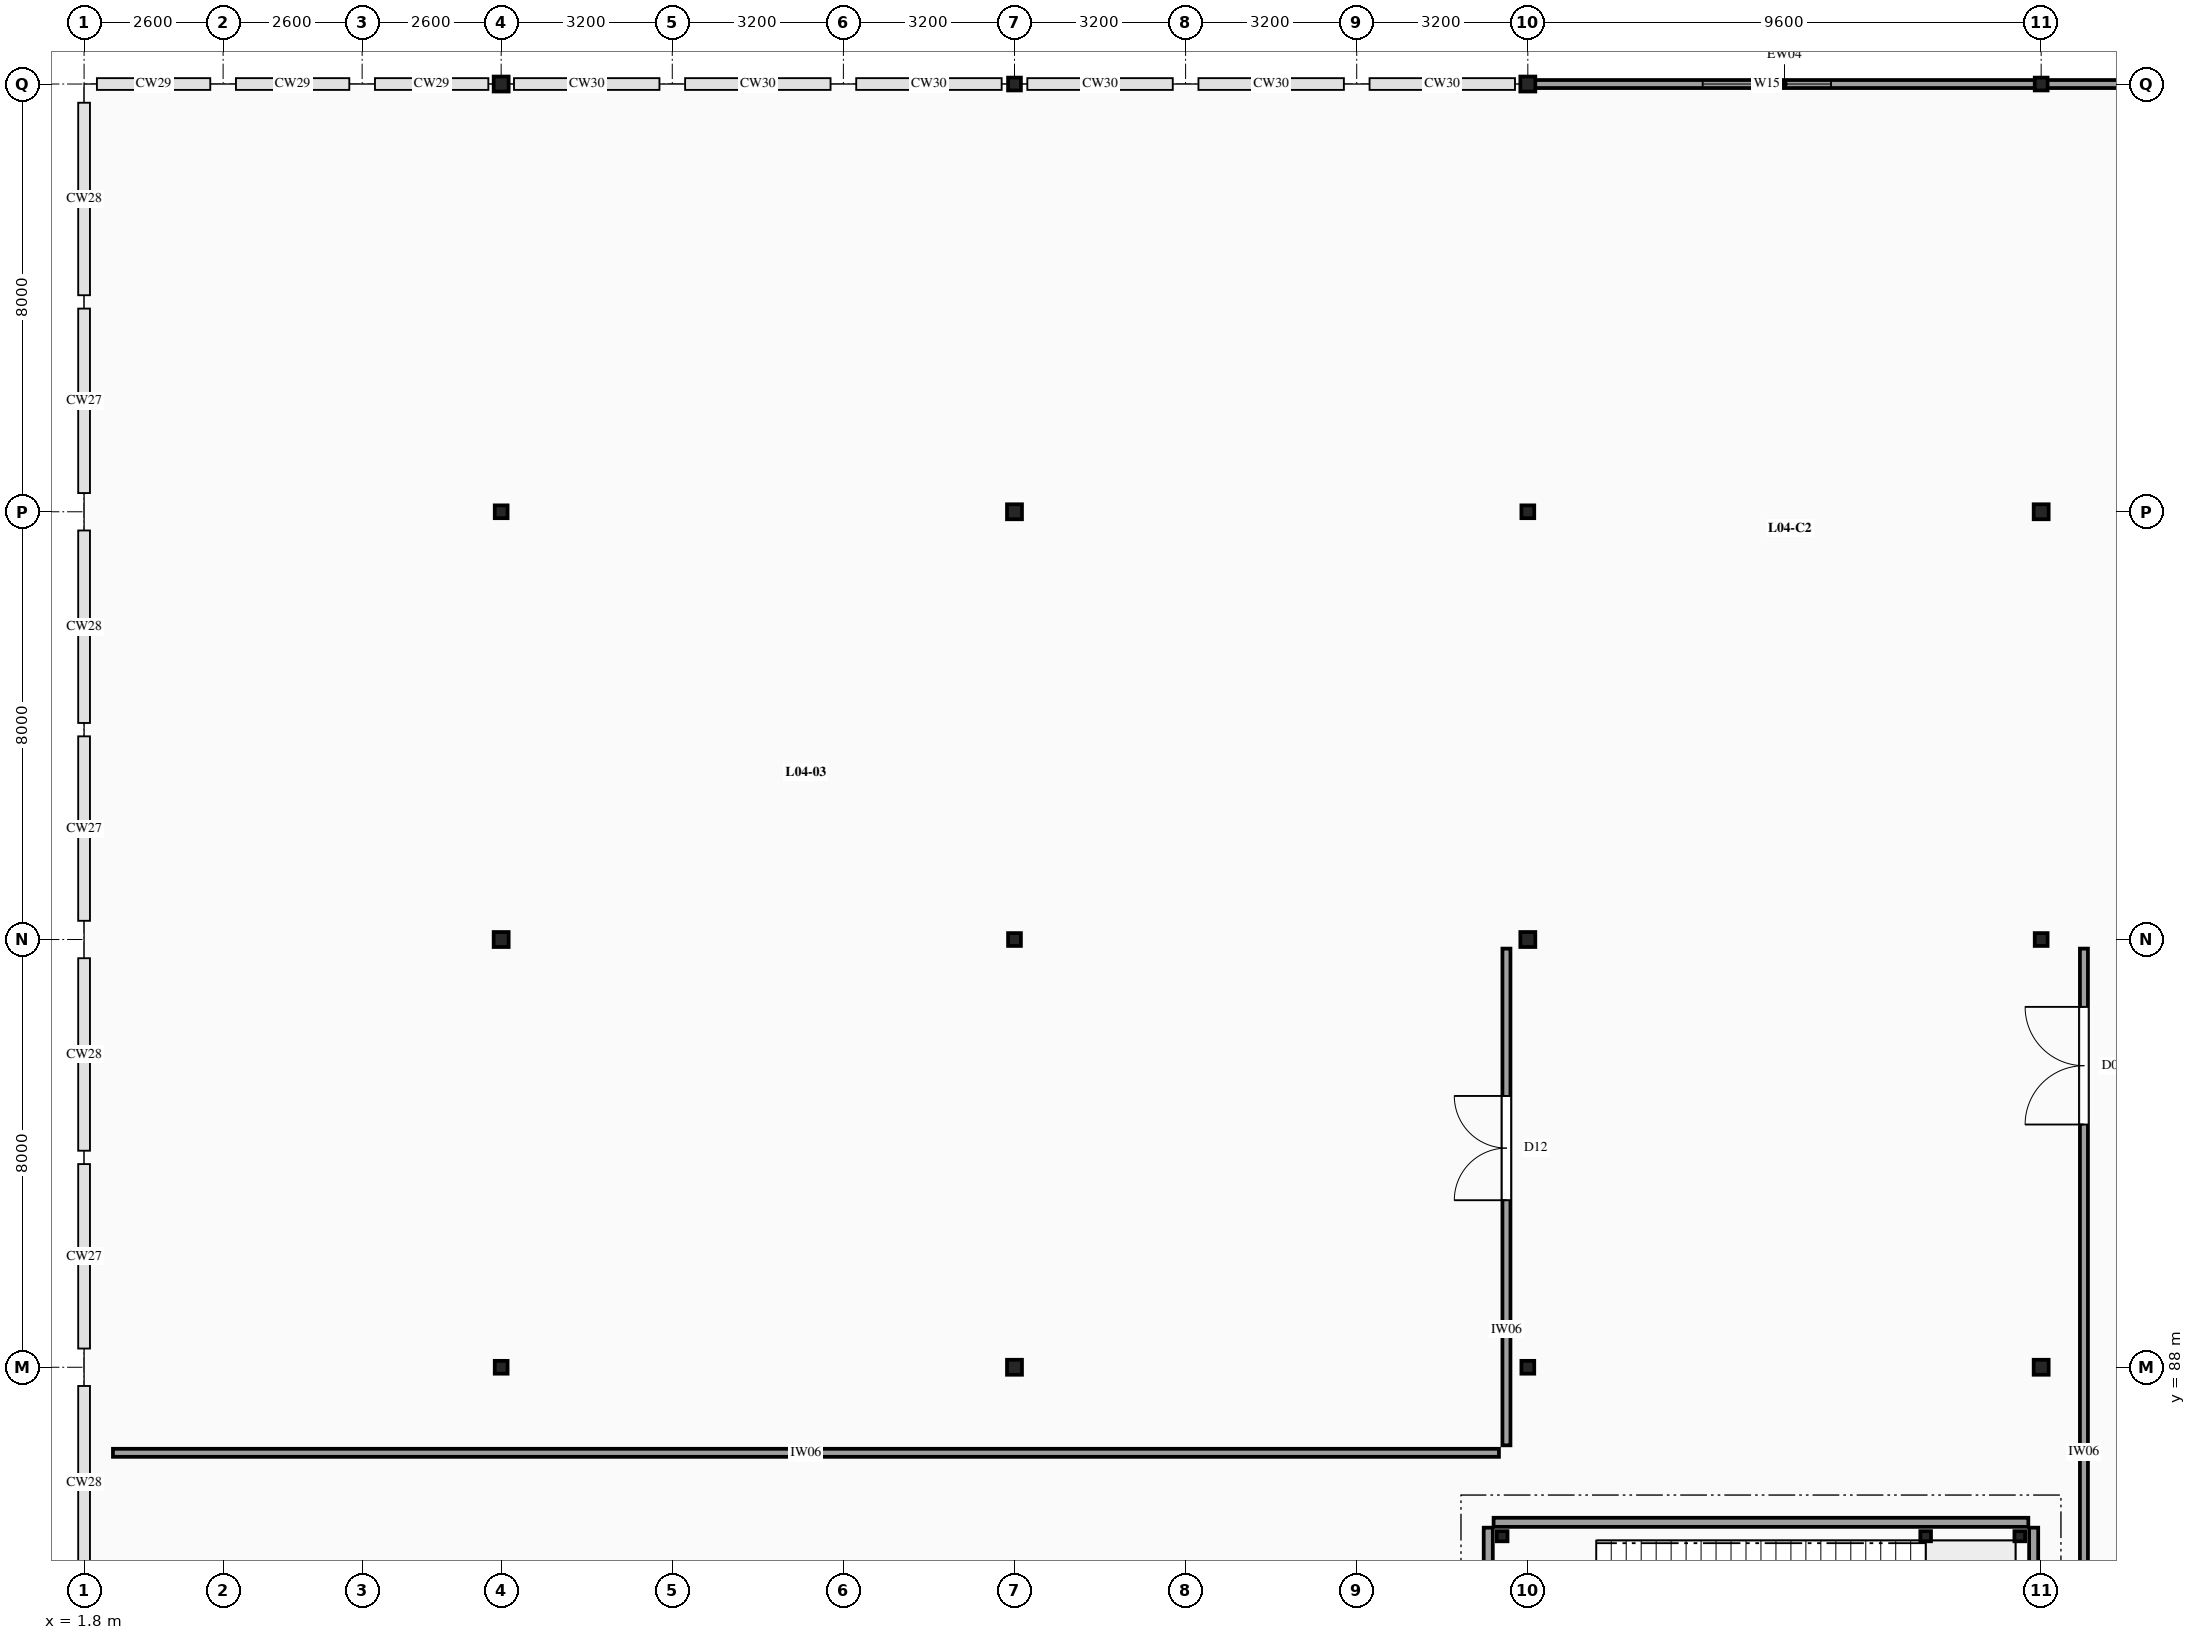
"""IFC4 building model, lengths in metres.
Left out: names, types, materials, properties, quantities, classifications, styles, units other than length and angle.
Written with IfcOpenShell. Run it as: python <this file> out.ifc"""

import sys

from ifc_helpers import new_model, si_unit, direction, frame, frame_2d, origin, origin_2d, place, context, subcontext, project, spatial, rectangle, i_section, extrude, element, fill, save


model = new_model("IFC4")
c1 = context("Model", 3, precision=1e-05, world=origin(), true_north=direction((0.0, 1.0)))
c2 = subcontext(c1, "Body", "Model", "MODEL_VIEW")
j1 = project(units=[si_unit("LENGTHUNIT", "METRE"), si_unit("PLANEANGLEUNIT", "RADIAN")], contexts=[c1])
p1 = place(None, origin())
s1 = spatial("IfcSite", under=j1, at=p1, CompositionType="ELEMENT")
p2 = place(p1, origin())
s2 = spatial("IfcBuilding", under=s1, at=p2, CompositionType="ELEMENT")
p3 = place(p2, frame((0.0, 0.0, 17.4)))
s3 = spatial("IfcBuildingStorey", under=s2, at=p3, CompositionType="ELEMENT", Elevation=17.4)
p4 = place(p3, frame((9.6, 88.0, -0.28), z_axis=(0.0, 0.0, 1.0), x_axis=(1.0, 0.0, 0.0)))
e1 = element("IfcColumn", 1, at=p4, inside=s3, PredefinedType="COLUMN", context=c2, shape_type="SweptSolid", body=[
    extrude(i_section(OverallWidth=0.24, OverallDepth=0.24, WebThickness=0.01, FlangeThickness=0.017, FilletRadius=0.021, at=origin_2d()), origin(), (0.0, 0.0, 1.0), 8.42),
])
p5 = place(p3, frame((9.6, 96.0, -0.28), z_axis=(0.0, 0.0, 1.0), x_axis=(1.0, 0.0, 0.0)))
e2 = element("IfcColumn", 2, at=p5, inside=s3, PredefinedType="COLUMN", context=c2, shape_type="SweptSolid", body=[
    extrude(i_section(OverallWidth=0.28, OverallDepth=0.28, WebThickness=0.01, FlangeThickness=0.018, FilletRadius=0.024, at=origin_2d()), origin(), (0.0, 0.0, 1.0), 8.42),
])
p6 = place(p3, frame((9.6, 104.0, -0.28), z_axis=(0.0, 0.0, 1.0), x_axis=(1.0, 0.0, 0.0)))
e3 = element("IfcColumn", 3, at=p6, inside=s3, PredefinedType="COLUMN", context=c2, shape_type="SweptSolid", body=[
    extrude(i_section(OverallWidth=0.24, OverallDepth=0.24, WebThickness=0.01, FlangeThickness=0.017, FilletRadius=0.021, at=origin_2d()), origin(), (0.0, 0.0, 1.0), 8.42),
])
for number, where, z_axis, x_axis in (
    (4, (9.6, 112.0, -0.28), (0.0, 0.0, 1.0), (1.0, 0.0, 0.0)),
    (5, (19.2, 88.0, -0.28), (0.0, 0.0, 1.0), (1.0, 0.0, 0.0)),
):
    element("IfcColumn", number, at=place(p3, frame(where, z_axis=z_axis, x_axis=x_axis)), inside=s3, PredefinedType="COLUMN", context=c2, shape_type="SweptSolid", body=[
        extrude(i_section(OverallWidth=0.28, OverallDepth=0.28, WebThickness=0.01, FlangeThickness=0.018, FilletRadius=0.024, at=origin_2d()), origin(), (0.0, 0.0, 1.0), 8.42),
    ])
p7 = place(p3, frame((19.2, 96.0, -0.28), z_axis=(0.0, 0.0, 1.0), x_axis=(1.0, 0.0, 0.0)))
e6 = element("IfcColumn", 6, at=p7, inside=s3, PredefinedType="COLUMN", context=c2, shape_type="SweptSolid", body=[
    extrude(i_section(OverallWidth=0.24, OverallDepth=0.24, WebThickness=0.01, FlangeThickness=0.017, FilletRadius=0.021, at=origin_2d()), origin(), (0.0, 0.0, 1.0), 8.42),
])
p8 = place(p3, frame((19.2, 104.0, -0.28), z_axis=(0.0, 0.0, 1.0), x_axis=(1.0, 0.0, 0.0)))
e7 = element("IfcColumn", 7, at=p8, inside=s3, PredefinedType="COLUMN", context=c2, shape_type="SweptSolid", body=[
    extrude(i_section(OverallWidth=0.28, OverallDepth=0.28, WebThickness=0.01, FlangeThickness=0.018, FilletRadius=0.024, at=origin_2d()), origin(), (0.0, 0.0, 1.0), 8.42),
])
for number, where, z_axis, x_axis in (
    (8, (19.2, 112.0, -0.28), (0.0, 0.0, 1.0), (1.0, 0.0, 0.0)),
    (9, (28.8, 88.0, -0.28), (0.0, 0.0, 1.0), (1.0, 0.0, 0.0)),
):
    element("IfcColumn", number, at=place(p3, frame(where, z_axis=z_axis, x_axis=x_axis)), inside=s3, PredefinedType="COLUMN", context=c2, shape_type="SweptSolid", body=[
        extrude(i_section(OverallWidth=0.24, OverallDepth=0.24, WebThickness=0.01, FlangeThickness=0.017, FilletRadius=0.021, at=origin_2d()), origin(), (0.0, 0.0, 1.0), 8.42),
    ])
p9 = place(p3, frame((28.8, 96.0, -0.28), z_axis=(0.0, 0.0, 1.0), x_axis=(1.0, 0.0, 0.0)))
e10 = element("IfcColumn", 10, at=p9, inside=s3, PredefinedType="COLUMN", context=c2, shape_type="SweptSolid", body=[
    extrude(i_section(OverallWidth=0.28, OverallDepth=0.28, WebThickness=0.01, FlangeThickness=0.018, FilletRadius=0.024, at=origin_2d()), origin(), (0.0, 0.0, 1.0), 8.42),
])
p10 = place(p3, frame((28.8, 104.0, -0.28), z_axis=(0.0, 0.0, 1.0), x_axis=(1.0, 0.0, 0.0)))
e11 = element("IfcColumn", 11, at=p10, inside=s3, PredefinedType="COLUMN", context=c2, shape_type="SweptSolid", body=[
    extrude(i_section(OverallWidth=0.24, OverallDepth=0.24, WebThickness=0.01, FlangeThickness=0.017, FilletRadius=0.021, at=origin_2d()), origin(), (0.0, 0.0, 1.0), 8.42),
])
for number, where, z_axis, x_axis in (
    (12, (28.8, 112.0, -0.28), (0.0, 0.0, 1.0), (1.0, 0.0, 0.0)),
    (13, (38.4, 88.0, -0.28), (0.0, 0.0, 1.0), (1.0, 0.0, 0.0)),
):
    element("IfcColumn", number, at=place(p3, frame(where, z_axis=z_axis, x_axis=x_axis)), inside=s3, PredefinedType="COLUMN", context=c2, shape_type="SweptSolid", body=[
        extrude(i_section(OverallWidth=0.28, OverallDepth=0.28, WebThickness=0.01, FlangeThickness=0.018, FilletRadius=0.024, at=origin_2d()), origin(), (0.0, 0.0, 1.0), 8.42),
    ])
p11 = place(p3, frame((38.4, 96.0, -0.28), z_axis=(0.0, 0.0, 1.0), x_axis=(1.0, 0.0, 0.0)))
e14 = element("IfcColumn", 14, at=p11, inside=s3, PredefinedType="COLUMN", context=c2, shape_type="SweptSolid", body=[
    extrude(i_section(OverallWidth=0.24, OverallDepth=0.24, WebThickness=0.01, FlangeThickness=0.017, FilletRadius=0.021, at=origin_2d()), origin(), (0.0, 0.0, 1.0), 8.42),
])
p12 = place(p3, frame((38.4, 104.0, -0.28), z_axis=(0.0, 0.0, 1.0), x_axis=(1.0, 0.0, 0.0)))
e15 = element("IfcColumn", 15, at=p12, inside=s3, PredefinedType="COLUMN", context=c2, shape_type="SweptSolid", body=[
    extrude(i_section(OverallWidth=0.28, OverallDepth=0.28, WebThickness=0.01, FlangeThickness=0.018, FilletRadius=0.024, at=origin_2d()), origin(), (0.0, 0.0, 1.0), 8.42),
])
p13 = place(p3, frame((38.4, 112.0, -0.28), z_axis=(0.0, 0.0, 1.0), x_axis=(1.0, 0.0, 0.0)))
e16 = element("IfcColumn", 16, at=p13, inside=s3, PredefinedType="COLUMN", context=c2, shape_type="SweptSolid", body=[
    extrude(i_section(OverallWidth=0.24, OverallDepth=0.24, WebThickness=0.01, FlangeThickness=0.017, FilletRadius=0.021, at=origin_2d()), origin(), (0.0, 0.0, 1.0), 8.42),
])
for number, where, z_axis, x_axis in (
    (17, (38.0, 84.84, 0.0), (0.0, 0.0, 1.0), (1.0, 0.0, 0.0)),
    (18, (28.32, 84.84, 0.0), (0.0, 0.0, 1.0), (1.0, 0.0, 0.0)),
    (19, (36.24, 84.84, 0.0), (0.0, 0.0, 1.0), (1.0, 0.0, 0.0)),
):
    element("IfcColumn", number, at=place(p3, frame(where, z_axis=z_axis, x_axis=x_axis)), inside=s3, PredefinedType="COLUMN", context=c2, shape_type="SweptSolid", body=[
        extrude(i_section(OverallWidth=0.2, OverallDepth=0.19, WebThickness=0.007, FlangeThickness=0.01, FilletRadius=0.018, at=origin_2d()), origin(), (0.0, 0.0, 1.0), 8.4),
    ])
p14 = place(p3, frame((28.82, 112.0, 0.0), z_axis=(0.0, 0.0, 1.0), x_axis=(1.0, 0.0, 0.0)))
e20 = element("IfcWall", 20, at=p14, inside=s3, PredefinedType="SOLIDWALL", context=c2, shape_type="SweptSolid", body=[
    extrude(rectangle(XDim=9.56, YDim=0.15, at=frame_2d((4.78, 0.0))), origin(), (0.0, 0.0, 1.0), 7.6),
])
p15 = place(p14, frame((3.25, 0.0, 0.95)))
e21 = element("IfcOpeningElement", 21, at=p15, cuts=e20, PredefinedType="OPENING", context=c2, shape_type="SweptSolid", body=[
    extrude(rectangle(XDim=2.4, YDim=2.2, at=frame_2d((1.2, 1.1))), frame((0.0, 0.085, 0.0), z_axis=(0.0, -1.0, 0.0), x_axis=(1.0, 0.0, 0.0)), (0.0, 0.0, 1.0), 0.17),
])
p16 = place(p3, frame((38.42, 112.0, 0.0), z_axis=(0.0, 0.0, 1.0), x_axis=(1.0, 0.0, 0.0)))
e22 = element("IfcWall", 22, at=p16, inside=s3, PredefinedType="SOLIDWALL", context=c2, shape_type="SweptSolid", body=[
    extrude(rectangle(XDim=9.56, YDim=0.15, at=frame_2d((4.78, 0.0))), origin(), (0.0, 0.0, 1.0), 7.6),
])
p17 = place(p16, frame((3.25, 0.0, 0.95)))
e23 = element("IfcOpeningElement", 23, at=p17, cuts=e22, PredefinedType="OPENING", context=c2, shape_type="SweptSolid", body=[
    extrude(rectangle(XDim=2.4, YDim=2.2, at=frame_2d((1.2, 1.1))), frame((0.0, 0.085, 0.0), z_axis=(0.0, -1.0, 0.0), x_axis=(1.0, 0.0, 0.0)), (0.0, 0.0, 1.0), 0.17),
])
p18 = place(p3, frame((28.06, 80.96, 0.0), z_axis=(0.0, 0.0, 1.0), x_axis=(0.0, 1.0, 0.0)))
e24 = element("IfcWall", 24, at=p18, inside=s3, PredefinedType="SOLIDWALL", context=c2, shape_type="SweptSolid", body=[
    extrude(rectangle(XDim=4.04, YDim=0.17, at=frame_2d((2.02, 0.0))), origin(), (0.0, 0.0, 1.0), 7.5),
])
p19 = place(p18, frame((1.27, 0.0, 0.0)))
e25 = element("IfcOpeningElement", 25, at=p19, cuts=e24, PredefinedType="OPENING", context=c2, shape_type="SweptSolid", body=[
    extrude(rectangle(XDim=1.5, YDim=2.2, at=frame_2d((0.75, 1.1))), frame((0.0, 0.095, 0.0), z_axis=(0.0, -1.0, 0.0), x_axis=(1.0, 0.0, 0.0)), (0.0, 0.0, 1.0), 0.19),
])
p20 = place(p3, frame((38.26, 80.96, 0.0), z_axis=(0.0, 0.0, 1.0), x_axis=(0.0, 1.0, 0.0)))
e26 = element("IfcWall", 26, at=p20, inside=s3, PredefinedType="SOLIDWALL", context=c2, shape_type="SweptSolid", body=[
    extrude(rectangle(XDim=4.04, YDim=0.17, at=frame_2d((2.02, 0.0))), origin(), (0.0, 0.0, 1.0), 7.5),
])
p21 = place(p3, frame((28.16, 85.1, 0.0), z_axis=(0.0, 0.0, 1.0), x_axis=(1.0, 0.0, 0.0)))
e27 = element("IfcWall", 27, at=p21, inside=s3, PredefinedType="SOLIDWALL", context=c2, shape_type="SweptSolid", body=[
    extrude(rectangle(XDim=10.0, YDim=0.17, at=frame_2d((5.0, 0.0))), origin(), (0.0, 0.0, 1.0), 7.5),
])
p22 = place(p3, frame((2.34, 86.4, 0.0), z_axis=(0.0, 0.0, 1.0), x_axis=(1.0, 0.0, 0.0)))
e28 = element("IfcWall", 28, at=p22, inside=s3, PredefinedType="PARTITIONING", context=c2, shape_type="SweptSolid", body=[
    extrude(rectangle(XDim=25.92, YDim=0.15, at=frame_2d((12.96, 0.0))), origin(), (0.0, 0.0, 1.0), 7.5),
])
p23 = place(p3, frame((28.4, 86.54, 0.0), z_axis=(0.0, 0.0, 1.0), x_axis=(0.0, 1.0, 0.0)))
e29 = element("IfcWall", 29, at=p23, inside=s3, PredefinedType="PARTITIONING", context=c2, shape_type="SweptSolid", body=[
    extrude(rectangle(XDim=9.29, YDim=0.15, at=frame_2d((4.645, 0.0))), origin(), (0.0, 0.0, 1.0), 7.5),
])
p24 = place(p23, frame((4.584, 0.0, 0.0)))
e30 = element("IfcOpeningElement", 30, at=p24, cuts=e29, PredefinedType="OPENING", context=c2, shape_type="SweptSolid", body=[
    extrude(rectangle(XDim=1.95, YDim=2.55, at=frame_2d((0.975, 1.275))), frame((0.0, 0.085, 0.0), z_axis=(0.0, -1.0, 0.0), x_axis=(1.0, 0.0, 0.0)), (0.0, 0.0, 1.0), 0.17),
])
p25 = place(p3, frame((39.2, 80.54, 0.0), z_axis=(0.0, 0.0, 1.0), x_axis=(0.0, 1.0, 0.0)))
e31 = element("IfcWall", 31, at=p25, inside=s3, PredefinedType="PARTITIONING", context=c2, shape_type="SweptSolid", body=[
    extrude(rectangle(XDim=15.29, YDim=0.15, at=frame_2d((7.645, 0.0))), origin(), (0.0, 0.0, 1.0), 7.5),
])
p26 = place(p25, frame((12.0, 0.0, 0.0)))
e32 = element("IfcOpeningElement", 32, at=p26, cuts=e31, PredefinedType="OPENING", context=c2, shape_type="SweptSolid", body=[
    extrude(rectangle(XDim=2.2, YDim=2.7, at=frame_2d((1.1, 1.35))), frame((0.0, 0.085, 0.0), z_axis=(0.0, -1.0, 0.0), x_axis=(1.0, 0.0, 0.0)), (0.0, 0.0, 1.0), 0.17),
])
p27 = place(p15, origin())
e33 = element("IfcWindow", 33, at=p27, inside=s3, PartitioningType="SINGLE_PANEL", PredefinedType="WINDOW", context=c2, shape_type="SweptSolid", body=[
    extrude(rectangle(XDim=2.4, YDim=2.2, at=frame_2d((1.2, 1.1))), frame((0.0, 0.03, 0.0), z_axis=(0.0, -1.0, 0.0), x_axis=(1.0, 0.0, 0.0)), (0.0, 0.0, 1.0), 0.06),
])
fill(e21, e33)
p28 = place(p24, origin())
e34 = element("IfcDoor", 34, at=p28, inside=s3, OperationType="DOUBLE_DOOR_SINGLE_SWING", PredefinedType="DOOR", context=c2, shape_type="SweptSolid", body=[
    extrude(rectangle(XDim=1.95, YDim=2.55, at=frame_2d((0.975, 1.275))), frame((0.0, 0.025, 0.0), z_axis=(0.0, -1.0, 0.0), x_axis=(1.0, 0.0, 0.0)), (0.0, 0.0, 1.0), 0.05),
])
fill(e30, e34)
p29 = place(p26, origin())
e35 = element("IfcDoor", 35, at=p29, inside=s3, OperationType="DOUBLE_DOOR_SINGLE_SWING", PredefinedType="DOOR", context=c2, shape_type="SweptSolid", body=[
    extrude(rectangle(XDim=2.2, YDim=2.7, at=frame_2d((1.1, 1.35))), frame((0.0, 0.025, 0.0), z_axis=(0.0, -1.0, 0.0), x_axis=(1.0, 0.0, 0.0)), (0.0, 0.0, 1.0), 0.05),
])
fill(e32, e35)
save(model, sys.argv[1])
